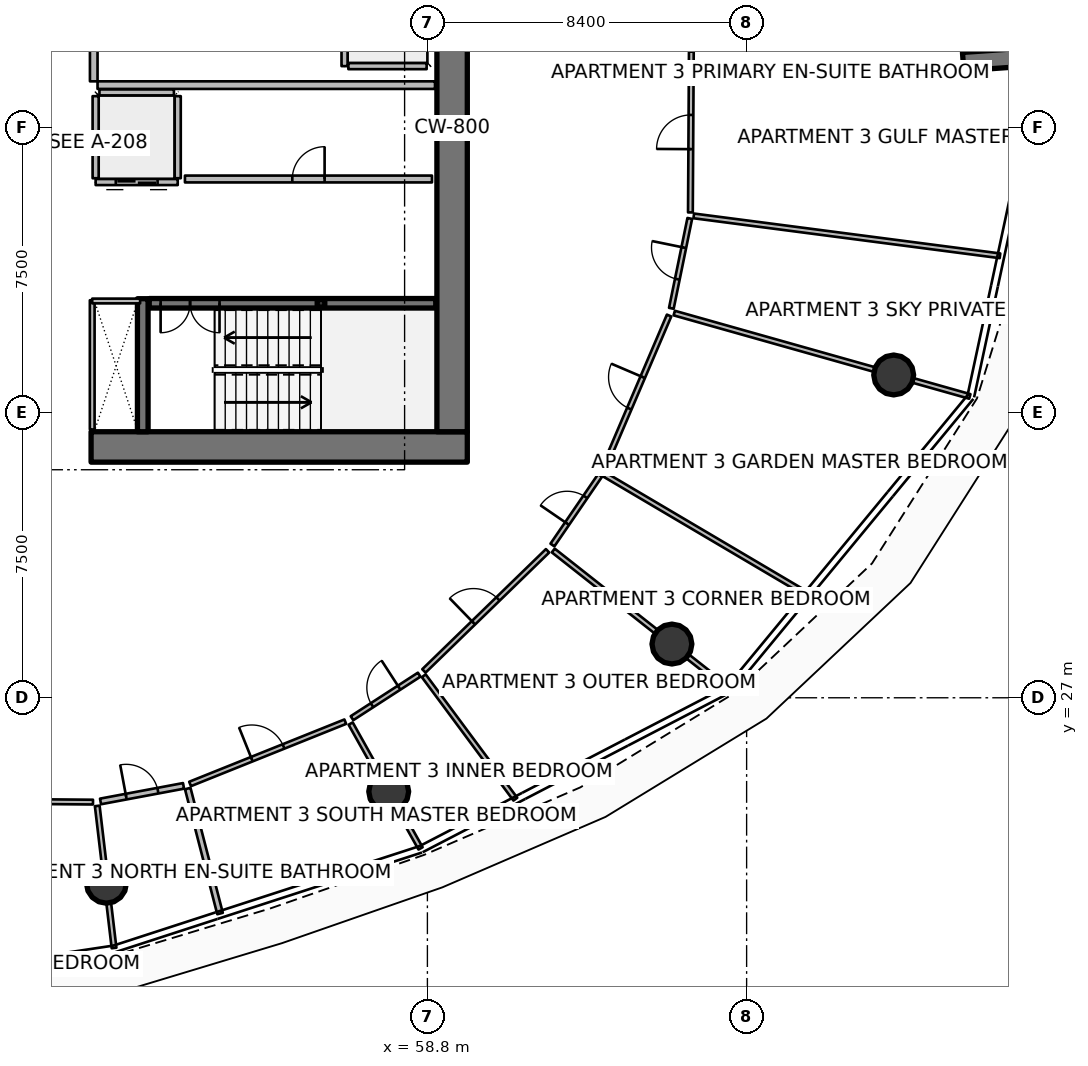
"""IFC4 building model, lengths in metres.
Left out: names, types, materials, properties, quantities, classifications, styles, units other than length and angle.
Written with IfcOpenShell. Run it as: python <this file> out.ifc"""

import sys

from ifc_helpers import new_model, si_unit, direction, frame, frame_2d, origin, origin_2d, place, context, subcontext, project, spatial, rectangle, hollow_rectangle, circle, extrude, element, fill, save


model = new_model("IFC4")
c1 = context("Model", 3, precision=1e-05, world=origin(), true_north=direction((0.0, 1.0)))
c2 = subcontext(c1, "Body", "Model", "MODEL_VIEW")
j1 = project(units=[si_unit("LENGTHUNIT", "METRE"), si_unit("PLANEANGLEUNIT", "RADIAN")], contexts=[c1])
p1 = place(None, origin())
s1 = spatial("IfcSite", under=j1, at=p1, CompositionType="ELEMENT")
p2 = place(p1, origin())
s2 = spatial("IfcBuilding", under=s1, at=p2, CompositionType="ELEMENT")
p3 = place(p2, frame((0.0, 0.0, 127.8)))
s3 = spatial("IfcBuildingStorey", under=s2, at=p3, CompositionType="ELEMENT", Elevation=127.8)
p4 = place(p3, frame((49.95, 33.6, 0.0), z_axis=(0.0, 0.0, 1.0), x_axis=(1.0, 0.0, 0.0)))
e1 = element("IfcWall", 1, at=p4, inside=s3, PredefinedType="SHEAR", context=c2, shape_type="SweptSolid", body=[
    extrude(rectangle(XDim=9.9, YDim=0.8, at=frame_2d((4.95, 0.0))), origin(), (0.0, 0.0, 1.0), 3.75),
])
p5 = place(p3, frame((59.45, 34.0, 0.0), z_axis=(0.0, 0.0, 1.0), x_axis=(0.0, 1.0, 0.0)))
e2 = element("IfcWall", 2, at=p5, inside=s3, PredefinedType="SHEAR", context=c2, shape_type="SweptSolid", body=[
    extrude(rectangle(XDim=16.0, YDim=0.8, at=frame_2d((8.0, 0.0))), origin(), (0.0, 0.0, 1.0), 3.75),
])
p6 = place(p3, frame((51.31, 34.0, 0.0), z_axis=(0.0, 0.0, 1.0), x_axis=(0.0, 1.0, 0.0)))
e3 = element("IfcWall", 3, at=p6, inside=s3, PredefinedType="SHEAR", context=c2, shape_type="SweptSolid", body=[
    extrude(rectangle(XDim=3.5, YDim=0.28, at=frame_2d((1.75, 0.0))), origin(), (0.0, 0.0, 1.0), 3.75),
])
p7 = place(p3, frame((56.0, 37.38, 0.0), z_axis=(0.0, 0.0, 1.0), x_axis=(1.0, 0.0, 0.0)))
e4 = element("IfcColumn", 4, at=p7, inside=s3, PredefinedType="COLUMN", context=c2, shape_type="SweptSolid", body=[
    extrude(hollow_rectangle(XDim=0.2, YDim=0.2, WallThickness=0.01, InnerFilletRadius=0.01, OuterFilletRadius=0.02, at=origin_2d()), origin(), (0.0, 0.0, 1.0), 1.67),
])
p8 = place(p3, frame((72.897, 43.741, 0.0), z_axis=(0.0, 0.0, 1.0), x_axis=(0.997564163539, 0.069754853754, 0.0)))
e5 = element("IfcWall", 5, at=p8, inside=s3, PredefinedType="SOLIDWALL", context=c2, shape_type="SweptSolid", body=[
    extrude(rectangle(XDim=3.5, YDim=0.48, at=frame_2d((1.75, 0.0))), origin(), (0.0, 0.0, 1.0), 3.75),
])
for number, where, z_axis, x_axis in (
    (6, (50.353, 22.119, 0.0), (0.0, 0.0, 1.0), (1.0, 0.0, 0.0)),
    (7, (57.782, 24.533, 0.0), (0.0, 0.0, 1.0), (1.0, 0.0, 0.0)),
    (8, (65.234, 28.414, 0.0), (0.0, 0.0, 1.0), (1.0, 0.0, 0.0)),
    (9, (71.07, 35.494, 0.0), (0.0, 0.0, 1.0), (1.0, 0.0, 0.0)),
):
    element("IfcColumn", number, at=place(p3, frame(where, z_axis=z_axis, x_axis=x_axis)), inside=s3, PredefinedType="COLUMN", context=c2, shape_type="SweptSolid", body=[
        extrude(circle(Radius=0.525, at=origin_2d()), origin(), (0.0, 0.0, 1.0), 3.5),
    ])
p9 = place(p3, frame((51.48, 37.38, 0.0), z_axis=(0.0, 0.0, 1.0), x_axis=(1.0, 0.0, 0.0)))
e10 = element("IfcWall", 10, at=p9, inside=s3, PredefinedType="SOLIDWALL", context=c2, shape_type="SweptSolid", body=[
    extrude(rectangle(XDim=7.54, YDim=0.25, at=frame_2d((3.77, 0.0))), origin(), (0.0, 0.0, 1.0), 3.5),
])
p10 = place(p9, frame((0.3, 0.0, 0.0)))
e11 = element("IfcOpeningElement", 11, at=p10, cuts=e10, PredefinedType="OPENING", context=c2, shape_type="SweptSolid", body=[
    extrude(rectangle(XDim=1.55, YDim=2.15, at=frame_2d((0.775, 1.075))), frame((0.0, 0.135, 0.0), z_axis=(0.0, -1.0, 0.0), x_axis=(1.0, 0.0, 0.0)), (0.0, 0.0, 1.0), 0.27),
])
p11 = place(p3, frame((56.62, 46.08, 0.0), z_axis=(0.0, 0.0, 1.0), x_axis=(0.0, -1.0, 0.0)))
e12 = element("IfcWall", 12, at=p11, inside=s3, PredefinedType="PARTITIONING", context=c2, shape_type="SweptSolid", body=[
    extrude(rectangle(XDim=2.46, YDim=0.16, at=frame_2d((1.23, 0.0))), origin(), (0.0, 0.0, 1.0), 3.5),
])
p12 = place(p11, frame((0.68, 0.0, 0.0)))
e13 = element("IfcOpeningElement", 13, at=p12, cuts=e12, PredefinedType="OPENING", context=c2, shape_type="SweptSolid", body=[
    extrude(rectangle(XDim=1.1, YDim=2.1, at=frame_2d((0.55, 1.05))), frame((0.0, 0.09, 0.0), z_axis=(0.0, -1.0, 0.0), x_axis=(1.0, 0.0, 0.0)), (0.0, 0.0, 1.0), 0.18),
])
p13 = place(p3, frame((56.72, 43.62, 0.0), z_axis=(0.0, 0.0, 1.0), x_axis=(1.0, 0.0, 0.0)))
e14 = element("IfcWall", 14, at=p13, inside=s3, PredefinedType="PARTITIONING", context=c2, shape_type="SweptSolid", body=[
    extrude(rectangle(XDim=2.06, YDim=0.16, at=frame_2d((1.03, 0.0))), origin(), (0.0, 0.0, 1.0), 3.5),
])
p14 = place(p3, frame((52.23, 40.57, 0.0), z_axis=(0.0, 0.0, 1.0), x_axis=(-1.0, 0.0, 0.0)))
e15 = element("IfcWall", 15, at=p14, inside=s3, PredefinedType="PARTITIONING", context=c2, shape_type="SweptSolid", body=[
    extrude(rectangle(XDim=2.16, YDim=0.16, at=frame_2d((1.08, 0.0))), origin(), (0.0, 0.0, 1.0), 3.5),
])
p15 = place(p14, frame((0.53, 0.0, 0.0)))
e16 = element("IfcOpeningElement", 16, at=p15, cuts=e15, PredefinedType="OPENING", context=c2, shape_type="SweptSolid", body=[
    extrude(rectangle(XDim=1.1, YDim=2.1, at=frame_2d((0.55, 1.05))), frame((0.0, 0.09, 0.0), z_axis=(0.0, -1.0, 0.0), x_axis=(1.0, 0.0, 0.0)), (0.0, 0.0, 1.0), 0.18),
])
for number, where, z_axis, x_axis in (
    (17, (52.23, 40.67, 0.0), (0.0, 0.0, 1.0), (0.0, 1.0, 0.0)),
    (18, (50.07, 40.67, 0.0), (0.0, 0.0, 1.0), (0.0, 1.0, 0.0)),
):
    element("IfcWall", number, at=place(p3, frame(where, z_axis=z_axis, x_axis=x_axis)), inside=s3, PredefinedType="PARTITIONING", context=c2, shape_type="SweptSolid", body=[
        extrude(rectangle(XDim=2.16, YDim=0.16, at=frame_2d((1.08, 0.0))), origin(), (0.0, 0.0, 1.0), 3.5),
    ])
p16 = place(p3, frame((50.17, 42.93, 0.0), z_axis=(0.0, 0.0, 1.0), x_axis=(1.0, 0.0, 0.0)))
e19 = element("IfcWall", 19, at=p16, inside=s3, PredefinedType="PARTITIONING", context=c2, shape_type="SweptSolid", body=[
    extrude(rectangle(XDim=1.96, YDim=0.16, at=frame_2d((0.98, 0.0))), origin(), (0.0, 0.0, 1.0), 3.5),
])
p17 = place(p3, frame((52.42, 40.65, 0.0), z_axis=(0.0, 0.0, 1.0), x_axis=(1.0, 0.0, 0.0)))
e20 = element("IfcWall", 20, at=p17, inside=s3, PredefinedType="PARTITIONING", context=c2, shape_type="SweptSolid", body=[
    extrude(rectangle(XDim=6.5, YDim=0.18, at=frame_2d((3.25, 0.0))), origin(), (0.0, 0.0, 1.0), 3.5),
])
p18 = place(p17, frame((2.825, 0.0, 0.0)))
e21 = element("IfcOpeningElement", 21, at=p18, cuts=e20, PredefinedType="OPENING", context=c2, shape_type="SweptSolid", body=[
    extrude(rectangle(XDim=0.85, YDim=2.06, at=frame_2d((0.425, 1.03))), frame((0.0, 0.1, 0.0), z_axis=(0.0, -1.0, 0.0), x_axis=(1.0, 0.0, 0.0)), (0.0, 0.0, 1.0), 0.2),
])
p19 = place(p3, frame((50.12, 43.12, 0.0), z_axis=(0.0, 0.0, 1.0), x_axis=(1.0, 0.0, 0.0)))
e22 = element("IfcWall", 22, at=p19, inside=s3, PredefinedType="PARTITIONING", context=c2, shape_type="SweptSolid", body=[
    extrude(rectangle(XDim=8.88, YDim=0.2, at=frame_2d((4.44, 0.0))), origin(), (0.0, 0.0, 1.0), 3.5),
])
p20 = place(p3, frame((50.02, 43.22, 0.0), z_axis=(0.0, 0.0, 1.0), x_axis=(0.0, 1.0, 0.0)))
e23 = element("IfcWall", 23, at=p20, inside=s3, PredefinedType="PARTITIONING", context=c2, shape_type="SweptSolid", body=[
    extrude(rectangle(XDim=3.3, YDim=0.2, at=frame_2d((1.65, 0.0))), origin(), (0.0, 0.0, 1.0), 3.5),
])
p21 = place(p20, frame((1.125, 0.0, 0.0)))
e24 = element("IfcOpeningElement", 24, at=p21, cuts=e23, PredefinedType="OPENING", context=c2, shape_type="SweptSolid", body=[
    extrude(rectangle(XDim=1.05, YDim=2.1, at=frame_2d((0.525, 1.05))), frame((0.0, 0.11, 0.0), z_axis=(0.0, -1.0, 0.0), x_axis=(1.0, 0.0, 0.0)), (0.0, 0.0, 1.0), 0.22),
])
p22 = place(p3, frame((49.98, 34.06, 0.0), z_axis=(0.0, 0.0, 1.0), x_axis=(0.0, 1.0, 0.0)))
e25 = element("IfcWall", 25, at=p22, inside=s3, PredefinedType="PARTITIONING", context=c2, shape_type="SweptSolid", body=[
    extrude(rectangle(XDim=3.4, YDim=0.125, at=frame_2d((1.7, 0.0))), origin(), (0.0, 0.0, 1.0), 2.94),
])
p23 = place(p3, frame((49.98, 37.44, 0.0), z_axis=(0.0, 0.0, 1.0), x_axis=(1.0, 0.0, 0.0)))
e26 = element("IfcWall", 26, at=p23, inside=s3, PredefinedType="PARTITIONING", context=c2, shape_type="SweptSolid", body=[
    extrude(rectangle(XDim=1.26, YDim=0.125, at=frame_2d((0.63, 0.0))), origin(), (0.0, 0.0, 1.0), 2.94),
])
p24 = place(p3, frame((45.687, 24.29, 0.0), z_axis=(0.0, 0.0, 1.0), x_axis=(0.999965854942, -0.008263712844, 0.0)))
e27 = element("IfcWall", 27, at=p24, inside=s3, PredefinedType="PARTITIONING", context=c2, shape_type="SweptSolid", body=[
    extrude(rectangle(XDim=4.313, YDim=0.125, at=frame_2d((2.157, 0.0))), origin(), (0.0, 0.0, 1.0), 2.94),
])
p25 = place(p24, frame((1.707, 0.0, 0.0)))
e28 = element("IfcOpeningElement", 28, at=p25, cuts=e27, PredefinedType="OPENING", context=c2, shape_type="SweptSolid", body=[
    extrude(rectangle(XDim=0.9, YDim=2.08, at=frame_2d((0.45, 1.04))), frame((0.0, 0.073, 0.0), z_axis=(0.0, -1.0, 0.0), x_axis=(1.0, 0.0, 0.0)), (0.0, 0.0, 1.0), 0.145),
])
p26 = place(p3, frame((50.112, 24.155, 0.0), z_axis=(0.0, 0.0, 1.0), x_axis=(0.117510984651, -0.99307158276, 0.0)))
e29 = element("IfcWall", 29, at=p26, inside=s3, PredefinedType="PARTITIONING", context=c2, shape_type="SweptSolid", body=[
    extrude(rectangle(XDim=3.765, YDim=0.125, at=frame_2d((1.882, 0.0))), origin(), (0.0, 0.0, 1.0), 2.94),
])
p27 = place(p3, frame((50.199, 24.272, 0.0), z_axis=(0.0, 0.0, 1.0), x_axis=(0.982859747054, 0.184354868719, 0.0)))
e30 = element("IfcWall", 30, at=p27, inside=s3, PredefinedType="PARTITIONING", context=c2, shape_type="SweptSolid", body=[
    extrude(rectangle(XDim=2.222, YDim=0.15, at=frame_2d((1.111, 0.0))), origin(), (0.0, 0.0, 1.0), 2.94),
])
p28 = place(p27, frame((0.686, 0.0, 0.0)))
e31 = element("IfcOpeningElement", 31, at=p28, cuts=e30, PredefinedType="OPENING", context=c2, shape_type="SweptSolid", body=[
    extrude(rectangle(XDim=0.85, YDim=2.06, at=frame_2d((0.425, 1.03))), frame((0.0, 0.085, 0.0), z_axis=(0.0, -1.0, 0.0), x_axis=(1.0, 0.0, 0.0)), (0.0, 0.0, 1.0), 0.17),
])
p29 = place(p3, frame((52.494, 24.611, 0.0), z_axis=(0.0, 0.0, 1.0), x_axis=(0.250138878085, -0.96820996776, 0.0)))
e32 = element("IfcWall", 32, at=p29, inside=s3, PredefinedType="PARTITIONING", context=c2, shape_type="SweptSolid", body=[
    extrude(rectangle(XDim=3.396, YDim=0.15, at=frame_2d((1.698, 0.0))), origin(), (0.0, 0.0, 1.0), 2.94),
])
p30 = place(p3, frame((52.555, 24.732, 0.0), z_axis=(0.0, 0.0, 1.0), x_axis=(0.928047573438, 0.372461677809, 0.0)))
e33 = element("IfcWall", 33, at=p30, inside=s3, PredefinedType="PARTITIONING", context=c2, shape_type="SweptSolid", body=[
    extrude(rectangle(XDim=4.401, YDim=0.125, at=frame_2d((2.2, 0.0))), origin(), (0.0, 0.0, 1.0), 2.94),
])
p31 = place(p30, frame((1.75, 0.0, 0.0)))
e34 = element("IfcOpeningElement", 34, at=p31, cuts=e33, PredefinedType="OPENING", context=c2, shape_type="SweptSolid", body=[
    extrude(rectangle(XDim=0.9, YDim=2.08, at=frame_2d((0.45, 1.04))), frame((0.0, 0.073, 0.0), z_axis=(0.0, -1.0, 0.0), x_axis=(1.0, 0.0, 0.0)), (0.0, 0.0, 1.0), 0.145),
])
p32 = place(p3, frame((56.781, 26.321, 0.0), z_axis=(0.0, 0.0, 1.0), x_axis=(0.488640887976, -0.872485004225, 0.0)))
e35 = element("IfcWall", 35, at=p32, inside=s3, PredefinedType="PARTITIONING", context=c2, shape_type="SweptSolid", body=[
    extrude(rectangle(XDim=3.765, YDim=0.125, at=frame_2d((1.882, 0.0))), origin(), (0.0, 0.0, 1.0), 2.94),
])
p33 = place(p3, frame((58.704, 27.579, 0.0), z_axis=(0.0, 0.0, 1.0), x_axis=(0.596041612314, -0.802953545599, 0.0)))
e36 = element("IfcWall", 36, at=p33, inside=s3, PredefinedType="PARTITIONING", context=c2, shape_type="SweptSolid", body=[
    extrude(rectangle(XDim=4.044, YDim=0.125, at=frame_2d((2.022, 0.0))), origin(), (0.0, 0.0, 1.0), 2.94),
])
p34 = place(p3, frame((56.816, 26.463, 0.0), z_axis=(0.0, 0.0, 1.0), x_axis=(0.839430168182, 0.543467563656, 0.0)))
e37 = element("IfcWall", 37, at=p34, inside=s3, PredefinedType="PARTITIONING", context=c2, shape_type="SweptSolid", body=[
    extrude(rectangle(XDim=2.106, YDim=0.125, at=frame_2d((1.053, 0.0))), origin(), (0.0, 0.0, 1.0), 2.94),
])
p35 = place(p34, frame((0.628, 0.0, 0.0)))
e38 = element("IfcOpeningElement", 38, at=p35, cuts=e37, PredefinedType="OPENING", context=c2, shape_type="SweptSolid", body=[
    extrude(rectangle(XDim=0.85, YDim=2.06, at=frame_2d((0.425, 1.03))), frame((0.0, 0.073, 0.0), z_axis=(0.0, -1.0, 0.0), x_axis=(1.0, 0.0, 0.0)), (0.0, 0.0, 1.0), 0.145),
])
p36 = place(p3, frame((58.708, 27.707, 0.0), z_axis=(0.0, 0.0, 1.0), x_axis=(0.717285529331, 0.696779354898, 0.0)))
e39 = element("IfcWall", 39, at=p36, inside=s3, PredefinedType="PARTITIONING", context=c2, shape_type="SweptSolid", body=[
    extrude(rectangle(XDim=4.536, YDim=0.125, at=frame_2d((2.268, 0.0))), origin(), (0.0, 0.0, 1.0), 2.94),
])
p37 = place(p36, frame((1.818, 0.0, 0.0)))
e40 = element("IfcOpeningElement", 40, at=p37, cuts=e39, PredefinedType="OPENING", context=c2, shape_type="SweptSolid", body=[
    extrude(rectangle(XDim=0.9, YDim=2.08, at=frame_2d((0.45, 1.04))), frame((0.0, 0.073, 0.0), z_axis=(0.0, -1.0, 0.0), x_axis=(1.0, 0.0, 0.0)), (0.0, 0.0, 1.0), 0.145),
])
p38 = place(p3, frame((62.112, 30.875, 0.0), z_axis=(0.0, 0.0, 1.0), x_axis=(0.785328664081, -0.619079065526, 0.0)))
e41 = element("IfcWall", 41, at=p38, inside=s3, PredefinedType="PARTITIONING", context=c2, shape_type="SweptSolid", body=[
    extrude(rectangle(XDim=5.87, YDim=0.125, at=frame_2d((2.935, 0.0))), origin(), (0.0, 0.0, 1.0), 2.94),
])
p39 = place(p3, frame((63.466, 32.87, 0.0), z_axis=(0.0, 0.0, 1.0), x_axis=(0.861154082878, -0.508344022826, 0.0)))
e42 = element("IfcWall", 42, at=p39, inside=s3, PredefinedType="PARTITIONING", context=c2, shape_type="SweptSolid", body=[
    extrude(rectangle(XDim=6.17, YDim=0.125, at=frame_2d((3.085, 0.0))), origin(), (0.0, 0.0, 1.0), 2.94),
])
p40 = place(p3, frame((62.09, 31.019, 0.0), z_axis=(0.0, 0.0, 1.0), x_axis=(0.56501922338, 0.825077740101, 0.0)))
e43 = element("IfcWall", 43, at=p40, inside=s3, PredefinedType="PARTITIONING", context=c2, shape_type="SweptSolid", body=[
    extrude(rectangle(XDim=2.218, YDim=0.125, at=frame_2d((1.109, 0.0))), origin(), (0.0, 0.0, 1.0), 2.94),
])
p41 = place(p40, frame((0.684, 0.0, 0.0)))
e44 = element("IfcOpeningElement", 44, at=p41, cuts=e43, PredefinedType="OPENING", context=c2, shape_type="SweptSolid", body=[
    extrude(rectangle(XDim=0.85, YDim=2.06, at=frame_2d((0.425, 1.03))), frame((0.0, 0.073, 0.0), z_axis=(0.0, -1.0, 0.0), x_axis=(1.0, 0.0, 0.0)), (0.0, 0.0, 1.0), 0.145),
])
p42 = place(p3, frame((63.42, 32.989, 0.0), z_axis=(0.0, 0.0, 1.0), x_axis=(0.393166713518, 0.919467201906, 0.0)))
e45 = element("IfcWall", 45, at=p42, inside=s3, PredefinedType="PARTITIONING", context=c2, shape_type="SweptSolid", body=[
    extrude(rectangle(XDim=4.425, YDim=0.125, at=frame_2d((2.212, 0.0))), origin(), (0.0, 0.0, 1.0), 2.94),
])
p43 = place(p42, frame((1.762, 0.0, 0.0)))
e46 = element("IfcOpeningElement", 46, at=p43, cuts=e45, PredefinedType="OPENING", context=c2, shape_type="SweptSolid", body=[
    extrude(rectangle(XDim=0.9, YDim=2.08, at=frame_2d((0.45, 1.04))), frame((0.0, 0.073, 0.0), z_axis=(0.0, -1.0, 0.0), x_axis=(1.0, 0.0, 0.0)), (0.0, 0.0, 1.0), 0.145),
])
p44 = place(p3, frame((65.295, 37.122, 0.0), z_axis=(0.0, 0.0, 1.0), x_axis=(0.96245433073, -0.271443661297, 0.0)))
e47 = element("IfcWall", 47, at=p44, inside=s3, PredefinedType="PARTITIONING", context=c2, shape_type="SweptSolid", body=[
    extrude(rectangle(XDim=8.081, YDim=0.125, at=frame_2d((4.041, 0.0))), origin(), (0.0, 0.0, 1.0), 2.94),
])
p45 = place(p3, frame((65.809, 39.679, 0.0), z_axis=(0.0, 0.0, 1.0), x_axis=(0.991611465086, -0.129254409247, 0.0)))
e48 = element("IfcWall", 48, at=p45, inside=s3, PredefinedType="PARTITIONING", context=c2, shape_type="SweptSolid", body=[
    extrude(rectangle(XDim=8.126, YDim=0.125, at=frame_2d((4.063, 0.0))), origin(), (0.0, 0.0, 1.0), 2.94),
])
p46 = place(p3, frame((65.219, 37.247, 0.0), z_axis=(0.0, 0.0, 1.0), x_axis=(0.20083963331, 0.979624132865, 0.0)))
e49 = element("IfcWall", 49, at=p46, inside=s3, PredefinedType="PARTITIONING", context=c2, shape_type="SweptSolid", body=[
    extrude(rectangle(XDim=2.414, YDim=0.125, at=frame_2d((1.207, 0.0))), origin(), (0.0, 0.0, 1.0), 2.94),
])
p47 = place(p46, frame((0.782, 0.0, 0.0)))
e50 = element("IfcOpeningElement", 50, at=p47, cuts=e49, PredefinedType="OPENING", context=c2, shape_type="SweptSolid", body=[
    extrude(rectangle(XDim=0.85, YDim=2.06, at=frame_2d((0.425, 1.03))), frame((0.0, 0.073, 0.0), z_axis=(0.0, -1.0, 0.0), x_axis=(1.0, 0.0, 0.0)), (0.0, 0.0, 1.0), 0.145),
])
p48 = place(p3, frame((65.721, 39.771, 0.0), z_axis=(0.0, 0.0, 1.0), x_axis=(0.005887343855, 0.999982669441, 0.0)))
e51 = element("IfcWall", 51, at=p48, inside=s3, PredefinedType="PARTITIONING", context=c2, shape_type="SweptSolid", body=[
    extrude(rectangle(XDim=4.23, YDim=0.125, at=frame_2d((2.115, 0.0))), origin(), (0.0, 0.0, 1.0), 2.94),
])
p49 = place(p48, frame((1.665, 0.0, 0.0)))
e52 = element("IfcOpeningElement", 52, at=p49, cuts=e51, PredefinedType="OPENING", context=c2, shape_type="SweptSolid", body=[
    extrude(rectangle(XDim=0.9, YDim=2.08, at=frame_2d((0.45, 1.04))), frame((0.0, 0.073, 0.0), z_axis=(0.0, -1.0, 0.0), x_axis=(1.0, 0.0, 0.0)), (0.0, 0.0, 1.0), 0.145),
])
p50 = place(p10, origin())
e53 = element("IfcDoor", 53, at=p50, inside=s3, OperationType="DOUBLE_DOOR_SINGLE_SWING", PredefinedType="DOOR", context=c2, shape_type="SweptSolid", body=[
    extrude(rectangle(XDim=1.55, YDim=2.15, at=frame_2d((0.775, 1.075))), frame((0.0, 0.025, 0.0), z_axis=(0.0, -1.0, 0.0), x_axis=(1.0, 0.0, 0.0)), (0.0, 0.0, 1.0), 0.05),
])
fill(e11, e53)
p51 = place(p15, origin())
e54 = element("IfcDoor", 54, at=p51, inside=s3, OperationType="DOUBLE_DOOR_SLIDING", PredefinedType="DOOR", context=c2, shape_type="SweptSolid", body=[
    extrude(rectangle(XDim=1.1, YDim=2.1, at=frame_2d((0.55, 1.05))), frame((0.0, 0.025, 0.0), z_axis=(0.0, -1.0, 0.0), x_axis=(1.0, 0.0, 0.0)), (0.0, 0.0, 1.0), 0.05),
])
fill(e16, e54)
p52 = place(p18, origin())
e55 = element("IfcDoor", 55, at=p52, inside=s3, OperationType="SINGLE_SWING_RIGHT", PredefinedType="DOOR", context=c2, shape_type="SweptSolid", body=[
    extrude(rectangle(XDim=0.85, YDim=2.06, at=frame_2d((0.425, 1.03))), frame((0.0, 0.025, 0.0), z_axis=(0.0, -1.0, 0.0), x_axis=(1.0, 0.0, 0.0)), (0.0, 0.0, 1.0), 0.05),
])
fill(e21, e55)
p53 = place(p28, origin())
e56 = element("IfcDoor", 56, at=p53, inside=s3, OperationType="SINGLE_SWING_LEFT", PredefinedType="DOOR", context=c2, shape_type="SweptSolid", body=[
    extrude(rectangle(XDim=0.85, YDim=2.06, at=frame_2d((0.425, 1.03))), frame((0.0, 0.025, 0.0), z_axis=(0.0, -1.0, 0.0), x_axis=(1.0, 0.0, 0.0)), (0.0, 0.0, 1.0), 0.05),
])
fill(e31, e56)
p54 = place(p31, origin())
e57 = element("IfcDoor", 57, at=p54, inside=s3, OperationType="SINGLE_SWING_LEFT", PredefinedType="DOOR", context=c2, shape_type="SweptSolid", body=[
    extrude(rectangle(XDim=0.9, YDim=2.08, at=frame_2d((0.45, 1.04))), frame((0.0, 0.025, 0.0), z_axis=(0.0, -1.0, 0.0), x_axis=(1.0, 0.0, 0.0)), (0.0, 0.0, 1.0), 0.05),
])
fill(e34, e57)
p55 = place(p35, origin())
e58 = element("IfcDoor", 58, at=p55, inside=s3, OperationType="SINGLE_SWING_RIGHT", PredefinedType="DOOR", context=c2, shape_type="SweptSolid", body=[
    extrude(rectangle(XDim=0.85, YDim=2.06, at=frame_2d((0.425, 1.03))), frame((0.0, 0.025, 0.0), z_axis=(0.0, -1.0, 0.0), x_axis=(1.0, 0.0, 0.0)), (0.0, 0.0, 1.0), 0.05),
])
fill(e38, e58)
p56 = place(p37, origin())
e59 = element("IfcDoor", 59, at=p56, inside=s3, OperationType="SINGLE_SWING_LEFT", PredefinedType="DOOR", context=c2, shape_type="SweptSolid", body=[
    extrude(rectangle(XDim=0.9, YDim=2.08, at=frame_2d((0.45, 1.04))), frame((0.0, 0.025, 0.0), z_axis=(0.0, -1.0, 0.0), x_axis=(1.0, 0.0, 0.0)), (0.0, 0.0, 1.0), 0.05),
])
fill(e40, e59)
p57 = place(p41, origin())
e60 = element("IfcDoor", 60, at=p57, inside=s3, OperationType="SINGLE_SWING_LEFT", PredefinedType="DOOR", context=c2, shape_type="SweptSolid", body=[
    extrude(rectangle(XDim=0.85, YDim=2.06, at=frame_2d((0.425, 1.03))), frame((0.0, 0.025, 0.0), z_axis=(0.0, -1.0, 0.0), x_axis=(1.0, 0.0, 0.0)), (0.0, 0.0, 1.0), 0.05),
])
fill(e44, e60)
p58 = place(p43, origin())
e61 = element("IfcDoor", 61, at=p58, inside=s3, OperationType="SINGLE_SWING_RIGHT", PredefinedType="DOOR", context=c2, shape_type="SweptSolid", body=[
    extrude(rectangle(XDim=0.9, YDim=2.08, at=frame_2d((0.45, 1.04))), frame((0.0, 0.025, 0.0), z_axis=(0.0, -1.0, 0.0), x_axis=(1.0, 0.0, 0.0)), (0.0, 0.0, 1.0), 0.05),
])
fill(e46, e61)
p59 = place(p47, origin())
e62 = element("IfcDoor", 62, at=p59, inside=s3, OperationType="SINGLE_SWING_RIGHT", PredefinedType="DOOR", context=c2, shape_type="SweptSolid", body=[
    extrude(rectangle(XDim=0.85, YDim=2.06, at=frame_2d((0.425, 1.03))), frame((0.0, 0.025, 0.0), z_axis=(0.0, -1.0, 0.0), x_axis=(1.0, 0.0, 0.0)), (0.0, 0.0, 1.0), 0.05),
])
fill(e50, e62)
p60 = place(p49, origin())
e63 = element("IfcDoor", 63, at=p60, inside=s3, OperationType="SINGLE_SWING_LEFT", PredefinedType="DOOR", context=c2, shape_type="SweptSolid", body=[
    extrude(rectangle(XDim=0.9, YDim=2.08, at=frame_2d((0.45, 1.04))), frame((0.0, 0.025, 0.0), z_axis=(0.0, -1.0, 0.0), x_axis=(1.0, 0.0, 0.0)), (0.0, 0.0, 1.0), 0.05),
])
fill(e52, e63)
save(model, sys.argv[1])
